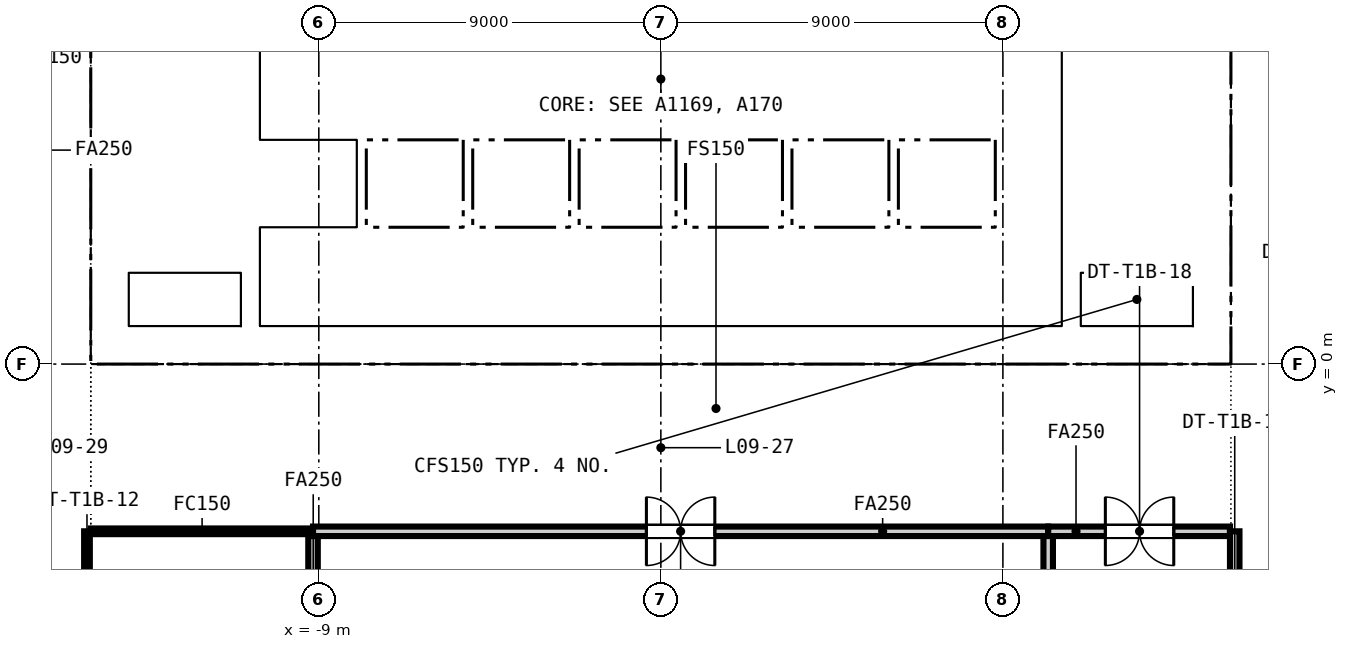
"""IFC4 building model, lengths in metres.
Left out: names, types, materials, properties, quantities, classifications, styles, units other than length and angle.
Written with IfcOpenShell. Run it as: python <this file> out.ifc"""

import sys

from ifc_helpers import new_model, si_unit, direction, frame, frame_2d, origin, place, context, subcontext, project, spatial, rectangle, extrude, element, fill, save


model = new_model("IFC4")
c1 = context("Model", 3, precision=1e-05, world=origin(), true_north=direction((0.0, 1.0)))
c2 = subcontext(c1, "Body", "Model", "MODEL_VIEW")
j1 = project(units=[si_unit("LENGTHUNIT", "METRE"), si_unit("PLANEANGLEUNIT", "RADIAN")], contexts=[c1])
p1 = place(None, origin())
s1 = spatial("IfcSite", under=j1, at=p1, CompositionType="ELEMENT")
p2 = place(p1, origin())
s2 = spatial("IfcBuilding", under=s1, at=p2, CompositionType="ELEMENT")
p3 = place(p2, frame((0.0, 0.0, 46.95)))
s3 = spatial("IfcBuildingStorey", under=s2, at=p3, CompositionType="ELEMENT", Elevation=46.95)
p4 = place(p3, frame((-15.0, 0.5, -0.15), z_axis=(0.0, 0.0, 1.0), x_axis=(1.0, 0.0, 0.0)))
e1 = element("IfcWall", 1, at=p4, inside=s3, PredefinedType="SOLIDWALL", context=c2, shape_type="SweptSolid", body=[
    extrude(rectangle(XDim=30.0, YDim=1.0, at=frame_2d((15.0, 0.0))), origin(), (0.0, 0.0, 1.0), 3.65),
])
p5 = place(p4, frame((5.8, 0.0, 0.15)))
e2 = element("IfcOpeningElement", 2, at=p5, cuts=e1, PredefinedType="OPENING", context=c2, shape_type="SweptSolid", body=[
    extrude(rectangle(XDim=2.4, YDim=2.4, at=frame_2d((1.2, 1.2))), frame((0.0, 0.51, 0.0), z_axis=(0.0, -1.0, 0.0), x_axis=(1.0, 0.0, 0.0)), (0.0, 0.0, 1.0), 1.02),
])
p6 = place(p4, frame((13.8, 0.0, 0.15)))
e3 = element("IfcOpeningElement", 3, at=p6, cuts=e1, PredefinedType="OPENING", context=c2, shape_type="SweptSolid", body=[
    extrude(rectangle(XDim=2.4, YDim=2.4, at=frame_2d((1.2, 1.2))), frame((0.0, 0.51, 0.0), z_axis=(0.0, -1.0, 0.0), x_axis=(1.0, 0.0, 0.0)), (0.0, 0.0, 1.0), 1.02),
])
p7 = place(p4, frame((21.8, 0.0, 0.15)))
e4 = element("IfcOpeningElement", 4, at=p7, cuts=e1, PredefinedType="OPENING", context=c2, shape_type="SweptSolid", body=[
    extrude(rectangle(XDim=2.4, YDim=2.4, at=frame_2d((1.2, 1.2))), frame((0.0, 0.51, 0.0), z_axis=(0.0, -1.0, 0.0), x_axis=(1.0, 0.0, 0.0)), (0.0, 0.0, 1.0), 1.02),
])
p8 = place(p4, frame((1.5, 0.0, 0.15)))
e5 = element("IfcOpeningElement", 5, at=p8, cuts=e1, PredefinedType="OPENING", context=c2, shape_type="SweptSolid", body=[
    extrude(rectangle(XDim=1.2, YDim=2.1, at=frame_2d((0.6, 1.05))), frame((0.0, 0.51, 0.0), z_axis=(0.0, -1.0, 0.0), x_axis=(1.0, 0.0, 0.0)), (0.0, 0.0, 1.0), 1.02),
])
p9 = place(p4, frame((27.3, 0.0, 0.15)))
e6 = element("IfcOpeningElement", 6, at=p9, cuts=e1, PredefinedType="OPENING", context=c2, shape_type="SweptSolid", body=[
    extrude(rectangle(XDim=1.2, YDim=2.1, at=frame_2d((0.6, 1.05))), frame((0.0, 0.51, 0.0), z_axis=(0.0, -1.0, 0.0), x_axis=(1.0, 0.0, 0.0)), (0.0, 0.0, 1.0), 1.02),
])
for number, where, z_axis, x_axis in (
    (7, (-14.5, 1.0, -0.15), (0.0, 0.0, 1.0), (0.0, 1.0, 0.0)),
    (8, (14.5, 1.0, -0.15), (0.0, 0.0, 1.0), (0.0, 1.0, 0.0)),
):
    element("IfcWall", number, at=place(p3, frame(where, z_axis=z_axis, x_axis=x_axis)), inside=s3, PredefinedType="SOLIDWALL", context=c2, shape_type="SweptSolid", body=[
        extrude(rectangle(XDim=13.0, YDim=1.0, at=frame_2d((6.5, 0.0))), origin(), (0.0, 0.0, 1.0), 3.65),
    ])
for number, where, z_axis, x_axis in (
    (9, (-10.8, 1.0, -0.15), (0.0, 0.0, 1.0), (0.0, 1.0, 0.0)),
    (10, (10.8, 1.0, -0.15), (0.0, 0.0, 1.0), (0.0, 1.0, 0.0)),
):
    element("IfcWall", number, at=place(p3, frame(where, z_axis=z_axis, x_axis=x_axis)), inside=s3, PredefinedType="SOLIDWALL", context=c2, shape_type="SweptSolid", body=[
        extrude(rectangle(XDim=13.0, YDim=0.5, at=frame_2d((6.5, 0.0))), origin(), (0.0, 0.0, 1.0), 3.65),
    ])
p10 = place(p3, frame((-10.55, 3.5, 0.0), z_axis=(0.0, 0.0, 1.0), x_axis=(1.0, 0.0, 0.0)))
e11 = element("IfcWall", 11, at=p10, inside=s3, PredefinedType="PARTITIONING", context=c2, shape_type="SweptSolid", body=[
    extrude(rectangle(XDim=21.1, YDim=0.2, at=frame_2d((10.55, 0.0))), origin(), (0.0, 0.0, 1.0), 3.5),
])
p11 = place(p10, frame((0.675, 0.0, 0.0)))
e12 = element("IfcOpeningElement", 12, at=p11, cuts=e11, PredefinedType="OPENING", context=c2, shape_type="SweptSolid", body=[
    extrude(rectangle(XDim=1.2, YDim=2.1, at=frame_2d((0.6, 1.05))), frame((0.0, 0.11, 0.0), z_axis=(0.0, -1.0, 0.0), x_axis=(1.0, 0.0, 0.0)), (0.0, 0.0, 1.0), 0.22),
])
p12 = place(p10, frame((3.475, 0.0, 0.0)))
e13 = element("IfcOpeningElement", 13, at=p12, cuts=e11, PredefinedType="OPENING", context=c2, shape_type="SweptSolid", body=[
    extrude(rectangle(XDim=1.2, YDim=2.1, at=frame_2d((0.6, 1.05))), frame((0.0, 0.11, 0.0), z_axis=(0.0, -1.0, 0.0), x_axis=(1.0, 0.0, 0.0)), (0.0, 0.0, 1.0), 0.22),
])
p13 = place(p10, frame((6.275, 0.0, 0.0)))
e14 = element("IfcOpeningElement", 14, at=p13, cuts=e11, PredefinedType="OPENING", context=c2, shape_type="SweptSolid", body=[
    extrude(rectangle(XDim=1.2, YDim=2.1, at=frame_2d((0.6, 1.05))), frame((0.0, 0.11, 0.0), z_axis=(0.0, -1.0, 0.0), x_axis=(1.0, 0.0, 0.0)), (0.0, 0.0, 1.0), 0.22),
])
p14 = place(p10, frame((9.075, 0.0, 0.0)))
e15 = element("IfcOpeningElement", 15, at=p14, cuts=e11, PredefinedType="OPENING", context=c2, shape_type="SweptSolid", body=[
    extrude(rectangle(XDim=1.2, YDim=2.1, at=frame_2d((0.6, 1.05))), frame((0.0, 0.11, 0.0), z_axis=(0.0, -1.0, 0.0), x_axis=(1.0, 0.0, 0.0)), (0.0, 0.0, 1.0), 0.22),
])
p15 = place(p10, frame((11.875, 0.0, 0.0)))
e16 = element("IfcOpeningElement", 16, at=p15, cuts=e11, PredefinedType="OPENING", context=c2, shape_type="SweptSolid", body=[
    extrude(rectangle(XDim=1.2, YDim=2.1, at=frame_2d((0.6, 1.05))), frame((0.0, 0.11, 0.0), z_axis=(0.0, -1.0, 0.0), x_axis=(1.0, 0.0, 0.0)), (0.0, 0.0, 1.0), 0.22),
])
p16 = place(p10, frame((14.675, 0.0, 0.0)))
e17 = element("IfcOpeningElement", 17, at=p16, cuts=e11, PredefinedType="OPENING", context=c2, shape_type="SweptSolid", body=[
    extrude(rectangle(XDim=1.2, YDim=2.1, at=frame_2d((0.6, 1.05))), frame((0.0, 0.11, 0.0), z_axis=(0.0, -1.0, 0.0), x_axis=(1.0, 0.0, 0.0)), (0.0, 0.0, 1.0), 0.22),
])
p17 = place(p10, frame((17.475, 0.0, 0.0)))
e18 = element("IfcOpeningElement", 18, at=p17, cuts=e11, PredefinedType="OPENING", context=c2, shape_type="SweptSolid", body=[
    extrude(rectangle(XDim=1.2, YDim=2.1, at=frame_2d((0.6, 1.05))), frame((0.0, 0.11, 0.0), z_axis=(0.0, -1.0, 0.0), x_axis=(1.0, 0.0, 0.0)), (0.0, 0.0, 1.0), 0.22),
])
p18 = place(p10, frame((19.9, 0.0, 0.0)))
e19 = element("IfcOpeningElement", 19, at=p18, cuts=e11, PredefinedType="OPENING", context=c2, shape_type="SweptSolid", body=[
    extrude(rectangle(XDim=0.9, YDim=2.1, at=frame_2d((0.45, 1.05))), frame((0.0, 0.11, 0.0), z_axis=(0.0, -1.0, 0.0), x_axis=(1.0, 0.0, 0.0)), (0.0, 0.0, 1.0), 0.22),
])
p19 = place(p3, frame((-10.55, 6.025, 0.0), z_axis=(0.0, 0.0, 1.0), x_axis=(1.0, 0.0, 0.0)))
e20 = element("IfcWall", 20, at=p19, inside=s3, PredefinedType="PARTITIONING", context=c2, shape_type="SweptSolid", body=[
    extrude(rectangle(XDim=21.1, YDim=0.25, at=frame_2d((10.55, 0.0))), origin(), (0.0, 0.0, 1.0), 3.5),
])
p20 = place(p3, frame((-4.125, 6.15, 0.0), z_axis=(0.0, 0.0, 1.0), x_axis=(0.0, 1.0, 0.0)))
e21 = element("IfcWall", 21, at=p20, inside=s3, PredefinedType="PARTITIONING", context=c2, shape_type="SweptSolid", body=[
    extrude(rectangle(XDim=4.95, YDim=0.25, at=frame_2d((2.475, 0.0))), origin(), (0.0, 0.0, 1.0), 3.5),
])
p21 = place(p20, frame((3.125, 0.0, 0.0)))
e22 = element("IfcOpeningElement", 22, at=p21, cuts=e21, PredefinedType="OPENING", context=c2, shape_type="SweptSolid", body=[
    extrude(rectangle(XDim=1.2, YDim=2.1, at=frame_2d((0.6, 1.05))), frame((0.0, 0.135, 0.0), z_axis=(0.0, -1.0, 0.0), x_axis=(1.0, 0.0, 0.0)), (0.0, 0.0, 1.0), 0.27),
])
for number, where, z_axis, x_axis in (
    (23, (-7.875, 3.6, 0.0), (0.0, 0.0, 1.0), (0.0, 1.0, 0.0)),
    (24, (-5.075, 3.6, 0.0), (0.0, 0.0, 1.0), (0.0, 1.0, 0.0)),
    (25, (-2.275, 3.6, 0.0), (0.0, 0.0, 1.0), (0.0, 1.0, 0.0)),
    (26, (0.525, 3.6, 0.0), (0.0, 0.0, 1.0), (0.0, 1.0, 0.0)),
    (27, (3.325, 3.6, 0.0), (0.0, 0.0, 1.0), (0.0, 1.0, 0.0)),
    (28, (6.125, 3.6, 0.0), (0.0, 0.0, 1.0), (0.0, 1.0, 0.0)),
    (29, (8.925, 3.6, 0.0), (0.0, 0.0, 1.0), (0.0, 1.0, 0.0)),
):
    element("IfcWall", number, at=place(p3, frame(where, z_axis=z_axis, x_axis=x_axis)), inside=s3, PredefinedType="PARTITIONING", context=c2, shape_type="SweptSolid", body=[
        extrude(rectangle(XDim=2.3, YDim=0.25, at=frame_2d((1.15, 0.0))), origin(), (0.0, 0.0, 1.0), 3.5),
    ])
for number, where, z_axis, x_axis in (
    (30, (1.7, 6.15, 0.0), (0.0, 0.0, 1.0), (0.0, 1.0, 0.0)),
    (31, (4.6, 6.15, 0.0), (0.0, 0.0, 1.0), (0.0, 1.0, 0.0)),
):
    element("IfcWall", number, at=place(p3, frame(where, z_axis=z_axis, x_axis=x_axis)), inside=s3, PredefinedType="PARTITIONING", context=c2, shape_type="SweptSolid", body=[
        extrude(rectangle(XDim=2.3, YDim=0.15, at=frame_2d((1.15, 0.0))), origin(), (0.0, 0.0, 1.0), 3.5),
    ])
p22 = place(p3, frame((8.925, 6.15, 0.0), z_axis=(0.0, 0.0, 1.0), x_axis=(0.0, 1.0, 0.0)))
e32 = element("IfcWall", 32, at=p22, inside=s3, PredefinedType="PARTITIONING", context=c2, shape_type="SweptSolid", body=[
    extrude(rectangle(XDim=2.3, YDim=0.25, at=frame_2d((1.15, 0.0))), origin(), (0.0, 0.0, 1.0), 3.5),
])
for number, where, z_axis, x_axis in (
    (33, (-14.0, 7.35, -0.15), (0.0, 0.0, 1.0), (1.0, 0.0, 0.0)),
    (34, (11.05, 7.35, -0.15), (0.0, 0.0, 1.0), (1.0, 0.0, 0.0)),
):
    element("IfcWall", number, at=place(p3, frame(where, z_axis=z_axis, x_axis=x_axis)), inside=s3, PredefinedType="SOLIDWALL", context=c2, shape_type="SweptSolid", body=[
        extrude(rectangle(XDim=2.95, YDim=0.3, at=frame_2d((1.475, 0.0))), origin(), (0.0, 0.0, 1.0), 3.65),
    ])
p23 = place(p3, frame((-9.152, -4.4, 0.0), z_axis=(0.0, 0.0, 1.0), x_axis=(-1.0, 0.0, 0.0)))
e35 = element("IfcWall", 35, at=p23, inside=s3, PredefinedType="PARTITIONING", context=c2, shape_type="SweptSolid", body=[
    extrude(rectangle(XDim=5.848, YDim=0.15, at=frame_2d((2.924, 0.0))), origin(), (0.0, 0.0, 1.0), 2.741),
])
p24 = place(p3, frame((10.192, -4.4, 0.0), z_axis=(0.0, 0.0, 1.0), x_axis=(-1.0, 0.0, 0.0)))
e36 = element("IfcWall", 36, at=p24, inside=s3, PredefinedType="PARTITIONING", context=c2, shape_type="SweptSolid", body=[
    extrude(rectangle(XDim=19.344, YDim=0.25, at=frame_2d((9.672, 0.0))), origin(), (0.0, 0.0, 1.0), 2.741),
])
p25 = place(p24, frame((8.772, 0.0, 0.0)))
e37 = element("IfcOpeningElement", 37, at=p25, cuts=e36, PredefinedType="OPENING", context=c2, shape_type="SweptSolid", body=[
    extrude(rectangle(XDim=1.8, YDim=2.1, at=frame_2d((0.9, 1.05))), frame((0.0, 0.135, 0.0), z_axis=(0.0, -1.0, 0.0), x_axis=(1.0, 0.0, 0.0)), (0.0, 0.0, 1.0), 0.27),
])
p26 = place(p3, frame((14.975, -4.4, 0.0), z_axis=(0.0, 0.0, 1.0), x_axis=(-1.0, 0.0, 0.0)))
e38 = element("IfcWall", 38, at=p26, inside=s3, PredefinedType="PARTITIONING", context=c2, shape_type="SweptSolid", body=[
    extrude(rectangle(XDim=4.783, YDim=0.25, at=frame_2d((2.392, 0.0))), origin(), (0.0, 0.0, 1.0), 2.741),
])
p27 = place(p26, frame((1.479, 0.0, 0.0)))
e39 = element("IfcOpeningElement", 39, at=p27, cuts=e38, PredefinedType="OPENING", context=c2, shape_type="SweptSolid", body=[
    extrude(rectangle(XDim=1.8, YDim=2.1, at=frame_2d((0.9, 1.05))), frame((0.0, 0.135, 0.0), z_axis=(0.0, -1.0, 0.0), x_axis=(1.0, 0.0, 0.0)), (0.0, 0.0, 1.0), 0.27),
])
p28 = place(p3, frame((-15.1, -4.4, 0.0), z_axis=(0.0, 0.0, 1.0), x_axis=(0.0, -1.0, 0.0)))
e40 = element("IfcWall", 40, at=p28, inside=s3, PredefinedType="PARTITIONING", context=c2, shape_type="SweptSolid", body=[
    extrude(rectangle(XDim=8.426, YDim=0.15, at=frame_2d((4.213, 0.0))), origin(), (0.0, 0.0, 1.0), 2.741),
])
p29 = place(p28, frame((3.713, 0.0, 0.0)))
e41 = element("IfcOpeningElement", 41, at=p29, cuts=e40, PredefinedType="OPENING", context=c2, shape_type="SweptSolid", body=[
    extrude(rectangle(XDim=1.0, YDim=2.1, at=frame_2d((0.5, 1.05))), frame((0.0, 0.085, 0.0), z_axis=(0.0, -1.0, 0.0), x_axis=(1.0, 0.0, 0.0)), (0.0, 0.0, 1.0), 0.17),
])
p30 = place(p3, frame((-9.152, -8.852, 0.0), z_axis=(0.0, 0.0, 1.0), x_axis=(0.0, 1.0, 0.0)))
e42 = element("IfcWall", 42, at=p30, inside=s3, PredefinedType="PARTITIONING", context=c2, shape_type="SweptSolid", body=[
    extrude(rectangle(XDim=4.327, YDim=0.25, at=frame_2d((2.164, 0.0))), origin(), (0.0, 0.0, 1.0), 2.741),
])
p31 = place(p3, frame((10.192, -29.22, 0.0), z_axis=(0.0, 0.0, 1.0), x_axis=(0.0, 1.0, 0.0)))
e43 = element("IfcWall", 43, at=p31, inside=s3, PredefinedType="PARTITIONING", context=c2, shape_type="SweptSolid", body=[
    extrude(rectangle(XDim=24.695, YDim=0.25, at=frame_2d((12.348, 0.0))), origin(), (0.0, 0.0, 1.0), 2.741),
])
p32 = place(p3, frame((15.1, -12.275, 0.0), z_axis=(0.0, 0.0, 1.0), x_axis=(0.0, 1.0, 0.0)))
e44 = element("IfcWall", 44, at=p32, inside=s3, PredefinedType="PARTITIONING", context=c2, shape_type="SweptSolid", body=[
    extrude(rectangle(XDim=7.875, YDim=0.25, at=frame_2d((3.938, 0.0))), origin(), (0.0, 0.0, 1.0), 2.741),
])
p33 = place(p32, frame((3.038, 0.0, 0.0)))
e45 = element("IfcOpeningElement", 45, at=p33, cuts=e44, PredefinedType="OPENING", context=c2, shape_type="SweptSolid", body=[
    extrude(rectangle(XDim=1.8, YDim=2.1, at=frame_2d((0.9, 1.05))), frame((0.0, 0.135, 0.0), z_axis=(0.0, -1.0, 0.0), x_axis=(1.0, 0.0, 0.0)), (0.0, 0.0, 1.0), 0.27),
])
p34 = place(p11, origin())
e46 = element("IfcDoor", 46, at=p34, inside=s3, OperationType="DOUBLE_DOOR_SLIDING", PredefinedType="DOOR", context=c2, shape_type="SweptSolid", body=[
    extrude(rectangle(XDim=1.2, YDim=2.1, at=frame_2d((0.6, 1.05))), frame((0.0, 0.025, 0.0), z_axis=(0.0, -1.0, 0.0), x_axis=(1.0, 0.0, 0.0)), (0.0, 0.0, 1.0), 0.05),
])
fill(e12, e46)
p35 = place(p12, origin())
e47 = element("IfcDoor", 47, at=p35, inside=s3, OperationType="DOUBLE_DOOR_SLIDING", PredefinedType="DOOR", context=c2, shape_type="SweptSolid", body=[
    extrude(rectangle(XDim=1.2, YDim=2.1, at=frame_2d((0.6, 1.05))), frame((0.0, 0.025, 0.0), z_axis=(0.0, -1.0, 0.0), x_axis=(1.0, 0.0, 0.0)), (0.0, 0.0, 1.0), 0.05),
])
fill(e13, e47)
p36 = place(p13, origin())
e48 = element("IfcDoor", 48, at=p36, inside=s3, OperationType="DOUBLE_DOOR_SLIDING", PredefinedType="DOOR", context=c2, shape_type="SweptSolid", body=[
    extrude(rectangle(XDim=1.2, YDim=2.1, at=frame_2d((0.6, 1.05))), frame((0.0, 0.025, 0.0), z_axis=(0.0, -1.0, 0.0), x_axis=(1.0, 0.0, 0.0)), (0.0, 0.0, 1.0), 0.05),
])
fill(e14, e48)
p37 = place(p14, origin())
e49 = element("IfcDoor", 49, at=p37, inside=s3, OperationType="DOUBLE_DOOR_SLIDING", PredefinedType="DOOR", context=c2, shape_type="SweptSolid", body=[
    extrude(rectangle(XDim=1.2, YDim=2.1, at=frame_2d((0.6, 1.05))), frame((0.0, 0.025, 0.0), z_axis=(0.0, -1.0, 0.0), x_axis=(1.0, 0.0, 0.0)), (0.0, 0.0, 1.0), 0.05),
])
fill(e15, e49)
p38 = place(p15, origin())
e50 = element("IfcDoor", 50, at=p38, inside=s3, OperationType="DOUBLE_DOOR_SLIDING", PredefinedType="DOOR", context=c2, shape_type="SweptSolid", body=[
    extrude(rectangle(XDim=1.2, YDim=2.1, at=frame_2d((0.6, 1.05))), frame((0.0, 0.025, 0.0), z_axis=(0.0, -1.0, 0.0), x_axis=(1.0, 0.0, 0.0)), (0.0, 0.0, 1.0), 0.05),
])
fill(e16, e50)
p39 = place(p16, origin())
e51 = element("IfcDoor", 51, at=p39, inside=s3, OperationType="DOUBLE_DOOR_SLIDING", PredefinedType="DOOR", context=c2, shape_type="SweptSolid", body=[
    extrude(rectangle(XDim=1.2, YDim=2.1, at=frame_2d((0.6, 1.05))), frame((0.0, 0.025, 0.0), z_axis=(0.0, -1.0, 0.0), x_axis=(1.0, 0.0, 0.0)), (0.0, 0.0, 1.0), 0.05),
])
fill(e17, e51)
p40 = place(p17, origin())
e52 = element("IfcDoor", 52, at=p40, inside=s3, OperationType="DOUBLE_DOOR_SLIDING", PredefinedType="DOOR", context=c2, shape_type="SweptSolid", body=[
    extrude(rectangle(XDim=1.2, YDim=2.1, at=frame_2d((0.6, 1.05))), frame((0.0, 0.025, 0.0), z_axis=(0.0, -1.0, 0.0), x_axis=(1.0, 0.0, 0.0)), (0.0, 0.0, 1.0), 0.05),
])
fill(e18, e52)
p41 = place(p18, origin())
e53 = element("IfcDoor", 53, at=p41, inside=s3, OperationType="SINGLE_SWING_RIGHT", PredefinedType="DOOR", context=c2, shape_type="SweptSolid", body=[
    extrude(rectangle(XDim=0.9, YDim=2.1, at=frame_2d((0.45, 1.05))), frame((0.0, 0.025, 0.0), z_axis=(0.0, -1.0, 0.0), x_axis=(1.0, 0.0, 0.0)), (0.0, 0.0, 1.0), 0.05),
])
fill(e19, e53)
p42 = place(p5, origin())
e54 = element("IfcDoor", 54, at=p42, inside=s3, OperationType="DOUBLE_DOOR_DOUBLE_SWING", PredefinedType="DOOR", context=c2, shape_type="SweptSolid", body=[
    extrude(rectangle(XDim=2.4, YDim=2.4, at=frame_2d((1.2, 1.2))), frame((0.0, 0.025, 0.0), z_axis=(0.0, -1.0, 0.0), x_axis=(1.0, 0.0, 0.0)), (0.0, 0.0, 1.0), 0.05),
])
fill(e2, e54)
p43 = place(p6, origin())
e55 = element("IfcDoor", 55, at=p43, inside=s3, OperationType="DOUBLE_DOOR_DOUBLE_SWING", PredefinedType="DOOR", context=c2, shape_type="SweptSolid", body=[
    extrude(rectangle(XDim=2.4, YDim=2.4, at=frame_2d((1.2, 1.2))), frame((0.0, 0.025, 0.0), z_axis=(0.0, -1.0, 0.0), x_axis=(1.0, 0.0, 0.0)), (0.0, 0.0, 1.0), 0.05),
])
fill(e3, e55)
p44 = place(p7, origin())
e56 = element("IfcDoor", 56, at=p44, inside=s3, OperationType="DOUBLE_DOOR_DOUBLE_SWING", PredefinedType="DOOR", context=c2, shape_type="SweptSolid", body=[
    extrude(rectangle(XDim=2.4, YDim=2.4, at=frame_2d((1.2, 1.2))), frame((0.0, 0.025, 0.0), z_axis=(0.0, -1.0, 0.0), x_axis=(1.0, 0.0, 0.0)), (0.0, 0.0, 1.0), 0.05),
])
fill(e4, e56)
p45 = place(p8, origin())
e57 = element("IfcDoor", 57, at=p45, inside=s3, OperationType="SINGLE_SWING_LEFT", PredefinedType="DOOR", context=c2, shape_type="SweptSolid", body=[
    extrude(rectangle(XDim=1.2, YDim=2.1, at=frame_2d((0.6, 1.05))), frame((0.0, 0.025, 0.0), z_axis=(0.0, -1.0, 0.0), x_axis=(1.0, 0.0, 0.0)), (0.0, 0.0, 1.0), 0.05),
])
fill(e5, e57)
p46 = place(p9, origin())
e58 = element("IfcDoor", 58, at=p46, inside=s3, OperationType="SINGLE_SWING_RIGHT", PredefinedType="DOOR", context=c2, shape_type="SweptSolid", body=[
    extrude(rectangle(XDim=1.2, YDim=2.1, at=frame_2d((0.6, 1.05))), frame((0.0, 0.025, 0.0), z_axis=(0.0, -1.0, 0.0), x_axis=(1.0, 0.0, 0.0)), (0.0, 0.0, 1.0), 0.05),
])
fill(e6, e58)
p47 = place(p25, origin())
e59 = element("IfcDoor", 59, at=p47, inside=s3, OperationType="DOUBLE_DOOR_DOUBLE_SWING", PredefinedType="DOOR", context=c2, shape_type="SweptSolid", body=[
    extrude(rectangle(XDim=1.8, YDim=2.1, at=frame_2d((0.9, 1.05))), frame((0.0, 0.025, 0.0), z_axis=(0.0, -1.0, 0.0), x_axis=(1.0, 0.0, 0.0)), (0.0, 0.0, 1.0), 0.05),
])
fill(e37, e59)
p48 = place(p27, origin())
e60 = element("IfcDoor", 60, at=p48, inside=s3, OperationType="DOUBLE_DOOR_DOUBLE_SWING", PredefinedType="DOOR", context=c2, shape_type="SweptSolid", body=[
    extrude(rectangle(XDim=1.8, YDim=2.1, at=frame_2d((0.9, 1.05))), frame((0.0, 0.025, 0.0), z_axis=(0.0, -1.0, 0.0), x_axis=(1.0, 0.0, 0.0)), (0.0, 0.0, 1.0), 0.05),
])
fill(e39, e60)
save(model, sys.argv[1])
